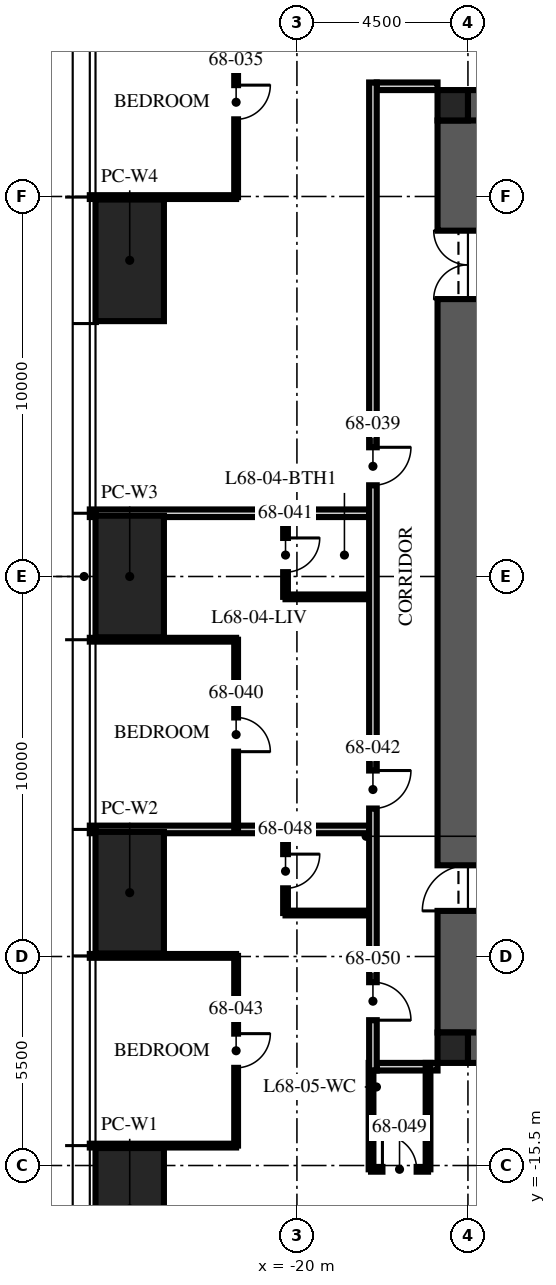
"""IFC4 building model, lengths in metres.
Left out: names, types, materials, properties, quantities, classifications, styles, units other than length and angle.
Written with IfcOpenShell. Run it as: python <this file> out.ifc"""

import sys

from ifc_helpers import new_model, si_unit, direction, frame, frame_2d, origin, origin_2d, place, context, subcontext, project, spatial, rectangle, hollow_rectangle, extrude, element, fill, save


model = new_model("IFC4")
c1 = context("Model", 3, precision=1e-05, world=origin(), true_north=direction((0.0, 1.0)))
c2 = subcontext(c1, "Body", "Model", "MODEL_VIEW")
j1 = project(units=[si_unit("LENGTHUNIT", "METRE"), si_unit("PLANEANGLEUNIT", "RADIAN")], contexts=[c1])
p1 = place(None, origin())
s1 = spatial("IfcSite", under=j1, at=p1, CompositionType="ELEMENT")
p2 = place(p1, origin())
s2 = spatial("IfcBuilding", under=s1, at=p2, CompositionType="ELEMENT")
p3 = place(p2, frame((0.0, 0.0, 270.75)))
s3 = spatial("IfcBuildingStorey", under=s2, at=p3, CompositionType="ELEMENT", Elevation=270.75)
for number, where, z_axis, x_axis in (
    (1, (-15.5, 12.0, -0.25), (0.0, 0.0, 1.0), (1.0, 0.0, 0.0)),
    (2, (-15.5, -12.0, -0.25), (0.0, 0.0, 1.0), (1.0, 0.0, 0.0)),
):
    element("IfcWall", number, at=place(p3, frame(where, z_axis=z_axis, x_axis=x_axis)), inside=s3, PredefinedType="SHEAR", context=c2, shape_type="SweptSolid", body=[
        extrude(rectangle(XDim=31.0, YDim=1.6, at=frame_2d((15.5, 0.0))), origin(), (0.0, 0.0, 1.0), 3.75),
    ])
p4 = place(p3, frame((-15.5, -12.0, -0.25), z_axis=(0.0, 0.0, 1.0), x_axis=(0.0, 1.0, 0.0)))
e3 = element("IfcWall", 3, at=p4, inside=s3, PredefinedType="SHEAR", context=c2, shape_type="SweptSolid", body=[
    extrude(rectangle(XDim=24.0, YDim=1.6, at=frame_2d((12.0, 0.0))), origin(), (0.0, 0.0, 1.0), 3.75),
])
p5 = place(p4, frame((3.2, 0.0, 0.25)))
e4 = element("IfcOpeningElement", 4, at=p5, cuts=e3, PredefinedType="OPENING", context=c2, shape_type="SweptSolid", body=[
    extrude(rectangle(XDim=1.2, YDim=2.1, at=frame_2d((0.6, 1.05))), frame((0.0, 0.81, 0.0), z_axis=(0.0, -1.0, 0.0), x_axis=(1.0, 0.0, 0.0)), (0.0, 0.0, 1.0), 1.62),
])
p6 = place(p4, frame((19.3, 0.0, 0.25)))
e5 = element("IfcOpeningElement", 5, at=p6, cuts=e3, PredefinedType="OPENING", context=c2, shape_type="SweptSolid", body=[
    extrude(rectangle(XDim=1.8, YDim=2.1, at=frame_2d((0.9, 1.05))), frame((0.0, 0.81, 0.0), z_axis=(0.0, -1.0, 0.0), x_axis=(1.0, 0.0, 0.0)), (0.0, 0.0, 1.0), 1.62),
])
for number, where, z_axis, x_axis in (
    (6, (-15.9, 12.4, -0.25), (0.0, 0.0, 1.0), (1.0, 0.0, 0.0)),
    (7, (-15.9, -12.4, -0.25), (0.0, 0.0, 1.0), (1.0, 0.0, 0.0)),
):
    element("IfcColumn", number, at=place(p3, frame(where, z_axis=z_axis, x_axis=x_axis)), inside=s3, PredefinedType="COLUMN", context=c2, shape_type="SweptSolid", body=[
        extrude(rectangle(XDim=0.8, YDim=0.8, at=origin_2d()), origin(), (0.0, 0.0, 1.0), 3.75),
    ])
for number, where, z_axis, x_axis in (
    (8, (-24.4, -16.64, 0.0), (0.0, 0.0, 1.0), (0.0, 1.0, 0.0)),
    (9, (-24.4, -8.32, 0.0), (0.0, 0.0, 1.0), (0.0, 1.0, 0.0)),
    (10, (-24.4, 0.0, 0.0), (0.0, 0.0, 1.0), (0.0, 1.0, 0.0)),
    (11, (-24.4, 8.32, 0.0), (0.0, 0.0, 1.0), (0.0, 1.0, 0.0)),
):
    element("IfcColumn", number, at=place(p3, frame(where, z_axis=z_axis, x_axis=x_axis)), inside=s3, PredefinedType="COLUMN", context=c2, shape_type="SweptSolid", body=[
        extrude(hollow_rectangle(XDim=3.2, YDim=1.8, WallThickness=0.14, at=origin_2d()), origin(), (0.0, 0.0, 1.0), 3.75),
    ])
for number, where, z_axis, x_axis in (
    (12, (-16.3, 12.9, 0.0), (0.0, 0.0, 1.0), (-1.0, 0.0, 0.0)),
    (13, (-16.3, -12.9, 0.0), (0.0, 0.0, 1.0), (-1.0, 0.0, 0.0)),
):
    element("IfcWall", number, at=place(p3, frame(where, z_axis=z_axis, x_axis=x_axis)), inside=s3, PredefinedType="PARTITIONING", context=c2, shape_type="SweptSolid", body=[
        extrude(rectangle(XDim=1.6, YDim=0.2, at=frame_2d((0.8, 0.0))), origin(), (0.0, 0.0, 1.0), 2.3),
    ])
p7 = place(p3, frame((-21.6, 9.984, 0.0), z_axis=(0.0, 0.0, 1.0), x_axis=(-1.0, 0.0, 0.0)))
e14 = element("IfcWall", 14, at=p7, inside=s3, PredefinedType="PARTITIONING", context=c2, shape_type="SweptSolid", body=[
    extrude(rectangle(XDim=3.85, YDim=0.1, at=frame_2d((1.925, 0.0))), origin(), (0.0, 0.0, 1.0), 2.81),
])
p8 = place(p3, frame((-18.1, 1.664, 0.0), z_axis=(0.0, 0.0, 1.0), x_axis=(-1.0, 0.0, 0.0)))
e15 = element("IfcWall", 15, at=p8, inside=s3, PredefinedType="PARTITIONING", context=c2, shape_type="SweptSolid", body=[
    extrude(rectangle(XDim=7.35, YDim=0.2, at=frame_2d((3.675, 0.0))), origin(), (0.0, 0.0, 1.0), 2.81),
])
p9 = place(p3, frame((-21.6, -1.664, 0.0), z_axis=(0.0, 0.0, 1.0), x_axis=(-1.0, 0.0, 0.0)))
e16 = element("IfcWall", 16, at=p9, inside=s3, PredefinedType="PARTITIONING", context=c2, shape_type="SweptSolid", body=[
    extrude(rectangle(XDim=3.85, YDim=0.1, at=frame_2d((1.925, 0.0))), origin(), (0.0, 0.0, 1.0), 2.81),
])
p10 = place(p3, frame((-18.1, -6.656, 0.0), z_axis=(0.0, 0.0, 1.0), x_axis=(-1.0, 0.0, 0.0)))
e17 = element("IfcWall", 17, at=p10, inside=s3, PredefinedType="PARTITIONING", context=c2, shape_type="SweptSolid", body=[
    extrude(rectangle(XDim=7.35, YDim=0.2, at=frame_2d((3.675, 0.0))), origin(), (0.0, 0.0, 1.0), 2.81),
])
for number, where, z_axis, x_axis in (
    (18, (-21.6, -9.984, 0.0), (0.0, 0.0, 1.0), (-1.0, 0.0, 0.0)),
    (19, (-21.6, -14.976, 0.0), (0.0, 0.0, 1.0), (-1.0, 0.0, 0.0)),
):
    element("IfcWall", number, at=place(p3, frame(where, z_axis=z_axis, x_axis=x_axis)), inside=s3, PredefinedType="PARTITIONING", context=c2, shape_type="SweptSolid", body=[
        extrude(rectangle(XDim=3.85, YDim=0.1, at=frame_2d((1.925, 0.0))), origin(), (0.0, 0.0, 1.0), 2.81),
    ])
p11 = place(p3, frame((-21.6, 14.976, 0.0), z_axis=(0.0, 0.0, 1.0), x_axis=(0.0, -1.0, 0.0)))
e20 = element("IfcWall", 20, at=p11, inside=s3, PredefinedType="PARTITIONING", context=c2, shape_type="SweptSolid", body=[
    extrude(rectangle(XDim=4.992, YDim=0.1, at=frame_2d((2.496, 0.0))), origin(), (0.0, 0.0, 1.0), 2.71),
])
p12 = place(p11, frame((2.046, 0.0, 0.0)))
e21 = element("IfcOpeningElement", 21, at=p12, cuts=e20, PredefinedType="OPENING", context=c2, shape_type="SweptSolid", body=[
    extrude(rectangle(XDim=0.9, YDim=2.1, at=frame_2d((0.45, 1.05))), frame((0.0, 0.06, 0.0), z_axis=(0.0, -1.0, 0.0), x_axis=(1.0, 0.0, 0.0)), (0.0, 0.0, 1.0), 0.12),
])
p13 = place(p3, frame((-21.6, -1.664, 0.0), z_axis=(0.0, 0.0, 1.0), x_axis=(0.0, -1.0, 0.0)))
e22 = element("IfcWall", 22, at=p13, inside=s3, PredefinedType="PARTITIONING", context=c2, shape_type="SweptSolid", body=[
    extrude(rectangle(XDim=4.992, YDim=0.1, at=frame_2d((2.496, 0.0))), origin(), (0.0, 0.0, 1.0), 2.71),
])
p14 = place(p13, frame((2.046, 0.0, 0.0)))
e23 = element("IfcOpeningElement", 23, at=p14, cuts=e22, PredefinedType="OPENING", context=c2, shape_type="SweptSolid", body=[
    extrude(rectangle(XDim=0.9, YDim=2.1, at=frame_2d((0.45, 1.05))), frame((0.0, 0.06, 0.0), z_axis=(0.0, -1.0, 0.0), x_axis=(1.0, 0.0, 0.0)), (0.0, 0.0, 1.0), 0.12),
])
p15 = place(p3, frame((-20.3, 1.664, 0.0), z_axis=(0.0, 0.0, 1.0), x_axis=(0.0, -1.0, 0.0)))
e24 = element("IfcWall", 24, at=p15, inside=s3, PredefinedType="PARTITIONING", context=c2, shape_type="SweptSolid", body=[
    extrude(rectangle(XDim=2.2, YDim=0.125, at=frame_2d((1.1, 0.0))), origin(), (0.0, 0.0, 1.0), 2.6),
])
p16 = place(p15, frame((0.65, 0.0, 0.0)))
e25 = element("IfcOpeningElement", 25, at=p16, cuts=e24, PredefinedType="OPENING", context=c2, shape_type="SweptSolid", body=[
    extrude(rectangle(XDim=0.9, YDim=2.1, at=frame_2d((0.45, 1.05))), frame((0.0, 0.073, 0.0), z_axis=(0.0, -1.0, 0.0), x_axis=(1.0, 0.0, 0.0)), (0.0, 0.0, 1.0), 0.145),
])
p17 = place(p3, frame((-18.1, -0.536, 0.0), z_axis=(0.0, 0.0, 1.0), x_axis=(-1.0, 0.0, 0.0)))
e26 = element("IfcWall", 26, at=p17, inside=s3, PredefinedType="PARTITIONING", context=c2, shape_type="SweptSolid", body=[
    extrude(rectangle(XDim=2.2, YDim=0.125, at=frame_2d((1.1, 0.0))), origin(), (0.0, 0.0, 1.0), 3.5),
])
p18 = place(p3, frame((-21.6, -9.984, 0.0), z_axis=(0.0, 0.0, 1.0), x_axis=(0.0, -1.0, 0.0)))
e27 = element("IfcWall", 27, at=p18, inside=s3, PredefinedType="PARTITIONING", context=c2, shape_type="SweptSolid", body=[
    extrude(rectangle(XDim=4.992, YDim=0.1, at=frame_2d((2.496, 0.0))), origin(), (0.0, 0.0, 1.0), 2.71),
])
p19 = place(p18, frame((2.046, 0.0, 0.0)))
e28 = element("IfcOpeningElement", 28, at=p19, cuts=e27, PredefinedType="OPENING", context=c2, shape_type="SweptSolid", body=[
    extrude(rectangle(XDim=0.9, YDim=2.1, at=frame_2d((0.45, 1.05))), frame((0.0, 0.06, 0.0), z_axis=(0.0, -1.0, 0.0), x_axis=(1.0, 0.0, 0.0)), (0.0, 0.0, 1.0), 0.12),
])
p20 = place(p3, frame((-20.3, -6.656, 0.0), z_axis=(0.0, 0.0, 1.0), x_axis=(0.0, -1.0, 0.0)))
e29 = element("IfcWall", 29, at=p20, inside=s3, PredefinedType="PARTITIONING", context=c2, shape_type="SweptSolid", body=[
    extrude(rectangle(XDim=2.2, YDim=0.125, at=frame_2d((1.1, 0.0))), origin(), (0.0, 0.0, 1.0), 2.6),
])
p21 = place(p20, frame((0.65, 0.0, 0.0)))
e30 = element("IfcOpeningElement", 30, at=p21, cuts=e29, PredefinedType="OPENING", context=c2, shape_type="SweptSolid", body=[
    extrude(rectangle(XDim=0.9, YDim=2.1, at=frame_2d((0.45, 1.05))), frame((0.0, 0.073, 0.0), z_axis=(0.0, -1.0, 0.0), x_axis=(1.0, 0.0, 0.0)), (0.0, 0.0, 1.0), 0.145),
])
p22 = place(p3, frame((-18.1, -8.856, 0.0), z_axis=(0.0, 0.0, 1.0), x_axis=(-1.0, 0.0, 0.0)))
e31 = element("IfcWall", 31, at=p22, inside=s3, PredefinedType="PARTITIONING", context=c2, shape_type="SweptSolid", body=[
    extrude(rectangle(XDim=2.2, YDim=0.125, at=frame_2d((1.1, 0.0))), origin(), (0.0, 0.0, 1.0), 3.5),
])
p23 = place(p3, frame((-18.05, -15.6, 0.0), z_axis=(0.0, 0.0, 1.0), x_axis=(1.0, 0.0, 0.0)))
e32 = element("IfcWall", 32, at=p23, inside=s3, PredefinedType="PARTITIONING", context=c2, shape_type="SweptSolid", body=[
    extrude(rectangle(XDim=1.5, YDim=0.125, at=frame_2d((0.75, 0.0))), origin(), (0.0, 0.0, 1.0), 2.3),
])
p24 = place(p23, frame((0.3, 0.0, 0.0)))
e33 = element("IfcOpeningElement", 33, at=p24, cuts=e32, PredefinedType="OPENING", context=c2, shape_type="SweptSolid", body=[
    extrude(rectangle(XDim=0.9, YDim=2.1, at=frame_2d((0.45, 1.05))), frame((0.0, 0.073, 0.0), z_axis=(0.0, -1.0, 0.0), x_axis=(1.0, 0.0, 0.0)), (0.0, 0.0, 1.0), 0.145),
])
for number, where, z_axis, x_axis in (
    (34, (-18.05, -12.8, 0.0), (0.0, 0.0, 1.0), (0.0, -1.0, 0.0)),
    (35, (-16.55, -12.8, 0.0), (0.0, 0.0, 1.0), (0.0, -1.0, 0.0)),
):
    element("IfcWall", number, at=place(p3, frame(where, z_axis=z_axis, x_axis=x_axis)), inside=s3, PredefinedType="PARTITIONING", context=c2, shape_type="SweptSolid", body=[
        extrude(rectangle(XDim=2.8, YDim=0.125, at=frame_2d((1.4, 0.0))), origin(), (0.0, 0.0, 1.0), 2.3),
    ])
p25 = place(p3, frame((-18.0, 13.0, 0.0), z_axis=(0.0, 0.0, 1.0), x_axis=(0.0, -1.0, 0.0)))
e36 = element("IfcWall", 36, at=p25, inside=s3, PredefinedType="PARTITIONING", context=c2, shape_type="SweptSolid", body=[
    extrude(rectangle(XDim=26.0, YDim=0.2, at=frame_2d((13.0, 0.0))), origin(), (0.0, 0.0, 1.0), 2.6),
])
p26 = place(p25, frame((9.6, 0.0, 0.0)))
e37 = element("IfcOpeningElement", 37, at=p26, cuts=e36, PredefinedType="OPENING", context=c2, shape_type="SweptSolid", body=[
    extrude(rectangle(XDim=1.0, YDim=2.2, at=frame_2d((0.5, 1.1))), frame((0.0, 0.11, 0.0), z_axis=(0.0, -1.0, 0.0), x_axis=(1.0, 0.0, 0.0)), (0.0, 0.0, 1.0), 0.22),
])
p27 = place(p25, frame((18.106, 0.0, 0.0)))
e38 = element("IfcOpeningElement", 38, at=p27, cuts=e36, PredefinedType="OPENING", context=c2, shape_type="SweptSolid", body=[
    extrude(rectangle(XDim=1.0, YDim=2.2, at=frame_2d((0.5, 1.1))), frame((0.0, 0.11, 0.0), z_axis=(0.0, -1.0, 0.0), x_axis=(1.0, 0.0, 0.0)), (0.0, 0.0, 1.0), 0.22),
])
p28 = place(p25, frame((23.676, 0.0, 0.0)))
e39 = element("IfcOpeningElement", 39, at=p28, cuts=e36, PredefinedType="OPENING", context=c2, shape_type="SweptSolid", body=[
    extrude(rectangle(XDim=1.0, YDim=2.2, at=frame_2d((0.5, 1.1))), frame((0.0, 0.11, 0.0), z_axis=(0.0, -1.0, 0.0), x_axis=(1.0, 0.0, 0.0)), (0.0, 0.0, 1.0), 0.22),
])
p29 = place(p5, origin())
e40 = element("IfcDoor", 40, at=p29, inside=s3, OperationType="SINGLE_SWING_LEFT", PredefinedType="DOOR", context=c2, shape_type="SweptSolid", body=[
    extrude(rectangle(XDim=1.2, YDim=2.1, at=frame_2d((0.6, 1.05))), frame((0.0, 0.025, 0.0), z_axis=(0.0, -1.0, 0.0), x_axis=(1.0, 0.0, 0.0)), (0.0, 0.0, 1.0), 0.05),
])
fill(e4, e40)
p30 = place(p6, origin())
e41 = element("IfcDoor", 41, at=p30, inside=s3, OperationType="DOUBLE_DOOR_SINGLE_SWING", PredefinedType="DOOR", context=c2, shape_type="SweptSolid", body=[
    extrude(rectangle(XDim=1.8, YDim=2.1, at=frame_2d((0.9, 1.05))), frame((0.0, 0.025, 0.0), z_axis=(0.0, -1.0, 0.0), x_axis=(1.0, 0.0, 0.0)), (0.0, 0.0, 1.0), 0.05),
])
fill(e5, e41)
p31 = place(p12, origin())
e42 = element("IfcDoor", 42, at=p31, inside=s3, OperationType="SINGLE_SWING_LEFT", PredefinedType="DOOR", context=c2, shape_type="SweptSolid", body=[
    extrude(rectangle(XDim=0.9, YDim=2.1, at=frame_2d((0.45, 1.05))), frame((0.0, 0.025, 0.0), z_axis=(0.0, -1.0, 0.0), x_axis=(1.0, 0.0, 0.0)), (0.0, 0.0, 1.0), 0.05),
])
fill(e21, e42)
p32 = place(p26, origin())
e43 = element("IfcDoor", 43, at=p32, inside=s3, OperationType="SINGLE_SWING_LEFT", PredefinedType="DOOR", context=c2, shape_type="SweptSolid", body=[
    extrude(rectangle(XDim=1.0, YDim=2.2, at=frame_2d((0.5, 1.1))), frame((0.0, 0.025, 0.0), z_axis=(0.0, -1.0, 0.0), x_axis=(1.0, 0.0, 0.0)), (0.0, 0.0, 1.0), 0.05),
])
fill(e37, e43)
p33 = place(p14, origin())
e44 = element("IfcDoor", 44, at=p33, inside=s3, OperationType="SINGLE_SWING_RIGHT", PredefinedType="DOOR", context=c2, shape_type="SweptSolid", body=[
    extrude(rectangle(XDim=0.9, YDim=2.1, at=frame_2d((0.45, 1.05))), frame((0.0, 0.025, 0.0), z_axis=(0.0, -1.0, 0.0), x_axis=(1.0, 0.0, 0.0)), (0.0, 0.0, 1.0), 0.05),
])
fill(e23, e44)
p34 = place(p16, origin())
e45 = element("IfcDoor", 45, at=p34, inside=s3, OperationType="SINGLE_SWING_LEFT", PredefinedType="DOOR", context=c2, shape_type="SweptSolid", body=[
    extrude(rectangle(XDim=0.9, YDim=2.1, at=frame_2d((0.45, 1.05))), frame((0.0, 0.025, 0.0), z_axis=(0.0, -1.0, 0.0), x_axis=(1.0, 0.0, 0.0)), (0.0, 0.0, 1.0), 0.05),
])
fill(e25, e45)
p35 = place(p27, origin())
e46 = element("IfcDoor", 46, at=p35, inside=s3, OperationType="SINGLE_SWING_LEFT", PredefinedType="DOOR", context=c2, shape_type="SweptSolid", body=[
    extrude(rectangle(XDim=1.0, YDim=2.2, at=frame_2d((0.5, 1.1))), frame((0.0, 0.025, 0.0), z_axis=(0.0, -1.0, 0.0), x_axis=(1.0, 0.0, 0.0)), (0.0, 0.0, 1.0), 0.05),
])
fill(e38, e46)
p36 = place(p19, origin())
e47 = element("IfcDoor", 47, at=p36, inside=s3, OperationType="SINGLE_SWING_LEFT", PredefinedType="DOOR", context=c2, shape_type="SweptSolid", body=[
    extrude(rectangle(XDim=0.9, YDim=2.1, at=frame_2d((0.45, 1.05))), frame((0.0, 0.025, 0.0), z_axis=(0.0, -1.0, 0.0), x_axis=(1.0, 0.0, 0.0)), (0.0, 0.0, 1.0), 0.05),
])
fill(e28, e47)
p37 = place(p21, origin())
e48 = element("IfcDoor", 48, at=p37, inside=s3, OperationType="SINGLE_SWING_LEFT", PredefinedType="DOOR", context=c2, shape_type="SweptSolid", body=[
    extrude(rectangle(XDim=0.9, YDim=2.1, at=frame_2d((0.45, 1.05))), frame((0.0, 0.025, 0.0), z_axis=(0.0, -1.0, 0.0), x_axis=(1.0, 0.0, 0.0)), (0.0, 0.0, 1.0), 0.05),
])
fill(e30, e48)
p38 = place(p24, origin())
e49 = element("IfcDoor", 49, at=p38, inside=s3, OperationType="SINGLE_SWING_LEFT", PredefinedType="DOOR", context=c2, shape_type="SweptSolid", body=[
    extrude(rectangle(XDim=0.9, YDim=2.1, at=frame_2d((0.45, 1.05))), frame((0.0, 0.025, 0.0), z_axis=(0.0, -1.0, 0.0), x_axis=(1.0, 0.0, 0.0)), (0.0, 0.0, 1.0), 0.05),
])
fill(e33, e49)
p39 = place(p28, origin())
e50 = element("IfcDoor", 50, at=p39, inside=s3, OperationType="SINGLE_SWING_RIGHT", PredefinedType="DOOR", context=c2, shape_type="SweptSolid", body=[
    extrude(rectangle(XDim=1.0, YDim=2.2, at=frame_2d((0.5, 1.1))), frame((0.0, 0.025, 0.0), z_axis=(0.0, -1.0, 0.0), x_axis=(1.0, 0.0, 0.0)), (0.0, 0.0, 1.0), 0.05),
])
fill(e39, e50)
save(model, sys.argv[1])
